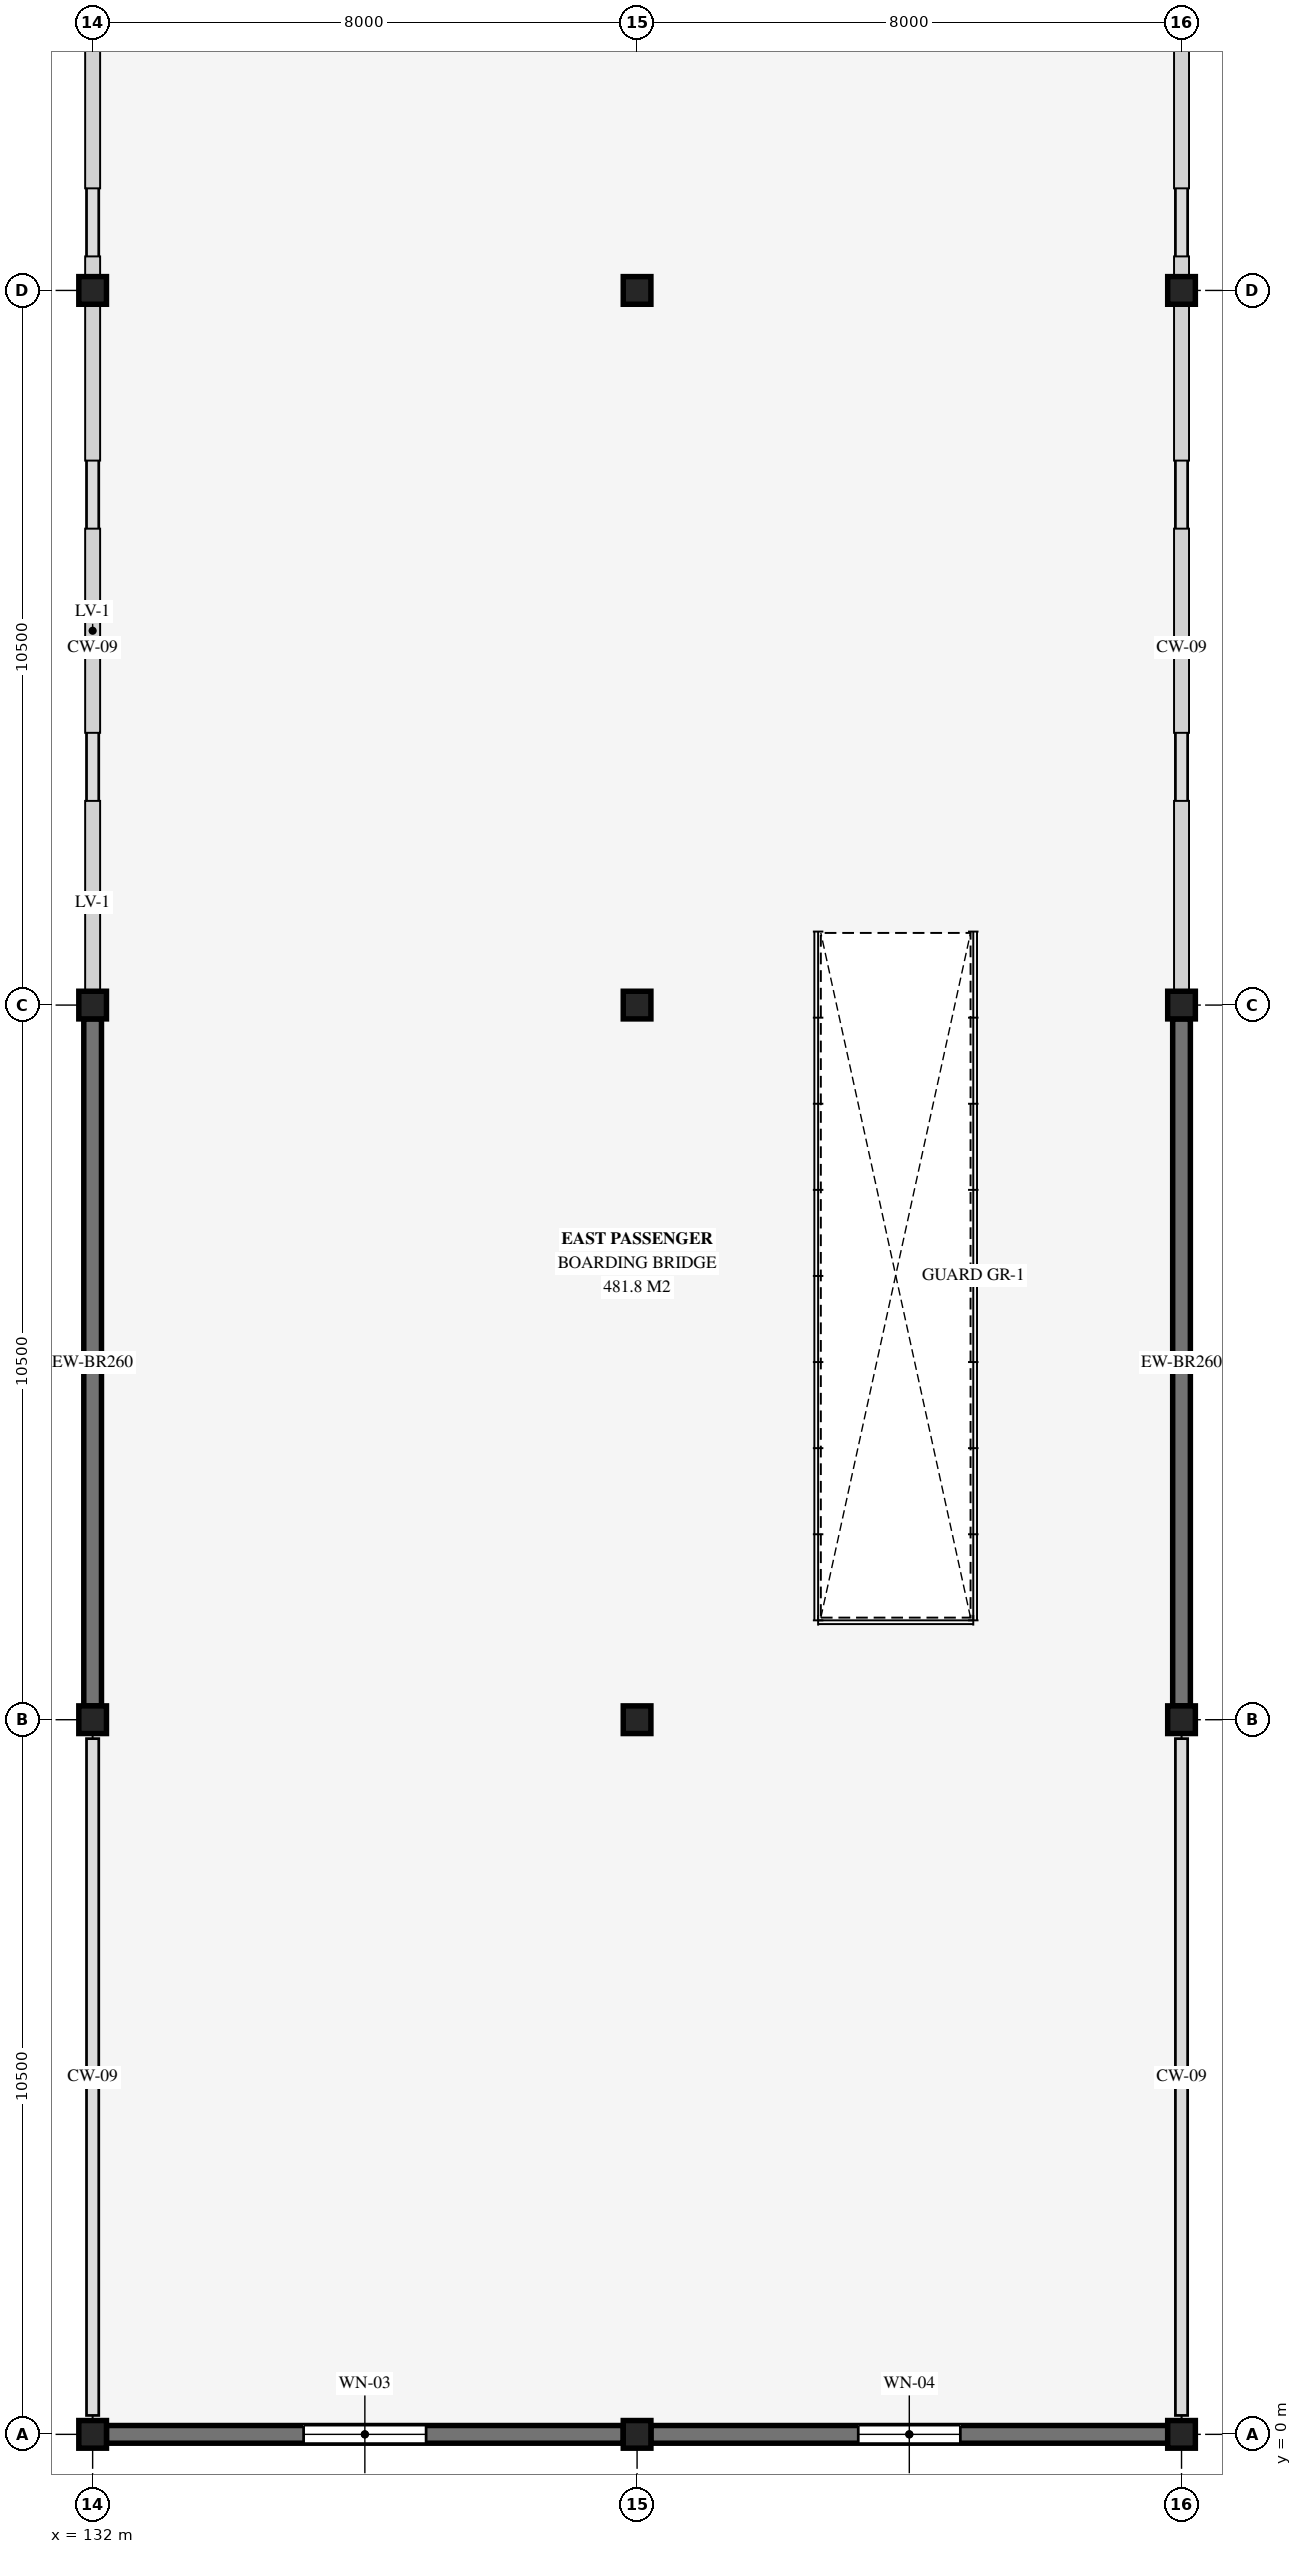
"""IFC4 building model, lengths in metres.
Left out: names, types, materials, properties, quantities, classifications, styles, units other than length and angle.
Written with IfcOpenShell. Run it as: python <this file> out.ifc"""

import sys

from ifc_helpers import new_model, si_unit, direction, frame, frame_2d, origin, origin_2d, place, context, subcontext, project, spatial, rectangle, hollow_circle, extrude, element, fill, save


model = new_model("IFC4")
c1 = context("Model", 3, precision=1e-05, world=origin(), true_north=direction((0.0, 1.0)))
c2 = subcontext(c1, "Body", "Model", "MODEL_VIEW")
j1 = project(units=[si_unit("LENGTHUNIT", "METRE"), si_unit("PLANEANGLEUNIT", "RADIAN")], contexts=[c1])
p1 = place(None, origin())
s1 = spatial("IfcSite", under=j1, at=p1, CompositionType="ELEMENT")
p2 = place(p1, origin())
s2 = spatial("IfcBuilding", under=s1, at=p2, CompositionType="ELEMENT")
p3 = place(p2, frame((0.0, 0.0, 5.4)))
s3 = spatial("IfcBuildingStorey", under=s2, at=p3, CompositionType="ELEMENT", Elevation=5.4)
for number, where, z_axis, x_axis in (
    (1, (132.0, 0.0, 0.0), (0.0, 0.0, 1.0), (1.0, 0.0, 0.0)),
    (2, (132.0, 10.5, 0.0), (0.0, 0.0, 1.0), (1.0, 0.0, 0.0)),
    (3, (132.0, 21.0, 0.0), (0.0, 0.0, 1.0), (1.0, 0.0, 0.0)),
    (4, (132.0, 31.5, 0.0), (0.0, 0.0, 1.0), (1.0, 0.0, 0.0)),
    (5, (140.0, 0.0, 0.0), (0.0, 0.0, 1.0), (1.0, 0.0, 0.0)),
    (6, (140.0, 10.5, 0.0), (0.0, 0.0, 1.0), (1.0, 0.0, 0.0)),
    (7, (140.0, 21.0, 0.0), (0.0, 0.0, 1.0), (1.0, 0.0, 0.0)),
    (8, (140.0, 31.5, 0.0), (0.0, 0.0, 1.0), (1.0, 0.0, 0.0)),
    (9, (148.0, 0.0, 0.0), (0.0, 0.0, 1.0), (1.0, 0.0, 0.0)),
    (10, (148.0, 10.5, 0.0), (0.0, 0.0, 1.0), (1.0, 0.0, 0.0)),
    (11, (148.0, 21.0, 0.0), (0.0, 0.0, 1.0), (1.0, 0.0, 0.0)),
    (12, (148.0, 31.5, 0.0), (0.0, 0.0, 1.0), (1.0, 0.0, 0.0)),
):
    element("IfcColumn", number, at=place(p3, frame(where, z_axis=z_axis, x_axis=x_axis)), inside=s3, PredefinedType="COLUMN", context=c2, shape_type="SweptSolid", body=[
        extrude(hollow_circle(Radius=0.203, WallThickness=0.016, at=origin_2d()), origin(), (0.0, 0.0, 1.0), 4.64),
    ])
for number, where, z_axis, x_axis in (
    (13, (132.0, 10.703, 0.0), (0.0, 0.0, 1.0), (0.0, 1.0, 0.0)),
    (14, (148.0, 10.703, 0.0), (0.0, 0.0, 1.0), (0.0, 1.0, 0.0)),
):
    element("IfcWall", number, at=place(p3, frame(where, z_axis=z_axis, x_axis=x_axis)), inside=s3, PredefinedType="SOLIDWALL", context=c2, shape_type="SweptSolid", body=[
        extrude(rectangle(XDim=10.094, YDim=0.26, at=frame_2d((5.047, 0.0))), origin(), (0.0, 0.0, 1.0), 4.52),
    ])
p4 = place(p3, frame((139.797, 0.0, 0.0), z_axis=(0.0, 0.0, 1.0), x_axis=(-1.0, 0.0, 0.0)))
e15 = element("IfcWall", 15, at=p4, inside=s3, PredefinedType="SOLIDWALL", context=c2, shape_type="SweptSolid", body=[
    extrude(rectangle(XDim=7.594, YDim=0.26, at=frame_2d((3.797, 0.0))), origin(), (0.0, 0.0, 1.0), 4.52),
])
p5 = place(p4, frame((2.897, 0.0, 1.0)))
e16 = element("IfcOpeningElement", 16, at=p5, cuts=e15, PredefinedType="OPENING", context=c2, shape_type="SweptSolid", body=[
    extrude(rectangle(XDim=1.8, YDim=2.2, at=frame_2d((0.9, 1.1))), frame((0.0, 0.14, 0.0), z_axis=(0.0, -1.0, 0.0), x_axis=(1.0, 0.0, 0.0)), (0.0, 0.0, 1.0), 0.28),
])
p6 = place(p3, frame((147.797, 0.0, 0.0), z_axis=(0.0, 0.0, 1.0), x_axis=(-1.0, 0.0, 0.0)))
e17 = element("IfcWall", 17, at=p6, inside=s3, PredefinedType="SOLIDWALL", context=c2, shape_type="SweptSolid", body=[
    extrude(rectangle(XDim=7.594, YDim=0.26, at=frame_2d((3.797, 0.0))), origin(), (0.0, 0.0, 1.0), 4.52),
])
p7 = place(p6, frame((3.047, 0.0, 1.0)))
e18 = element("IfcOpeningElement", 18, at=p7, cuts=e17, PredefinedType="OPENING", context=c2, shape_type="SweptSolid", body=[
    extrude(rectangle(XDim=1.5, YDim=2.2, at=frame_2d((0.75, 1.1))), frame((0.0, 0.14, 0.0), z_axis=(0.0, -1.0, 0.0), x_axis=(1.0, 0.0, 0.0)), (0.0, 0.0, 1.0), 0.28),
])
p8 = place(p5, origin())
e19 = element("IfcWindow", 19, at=p8, inside=s3, PartitioningType="SINGLE_PANEL", PredefinedType="WINDOW", context=c2, shape_type="SweptSolid", body=[
    extrude(rectangle(XDim=1.8, YDim=2.2, at=frame_2d((0.9, 1.1))), frame((0.0, 0.03, 0.0), z_axis=(0.0, -1.0, 0.0), x_axis=(1.0, 0.0, 0.0)), (0.0, 0.0, 1.0), 0.06),
])
fill(e16, e19)
p9 = place(p7, origin())
e20 = element("IfcWindow", 20, at=p9, inside=s3, PartitioningType="SINGLE_PANEL", PredefinedType="WINDOW", context=c2, shape_type="SweptSolid", body=[
    extrude(rectangle(XDim=1.5, YDim=2.2, at=frame_2d((0.75, 1.1))), frame((0.0, 0.03, 0.0), z_axis=(0.0, -1.0, 0.0), x_axis=(1.0, 0.0, 0.0)), (0.0, 0.0, 1.0), 0.06),
])
fill(e18, e20)
save(model, sys.argv[1])
